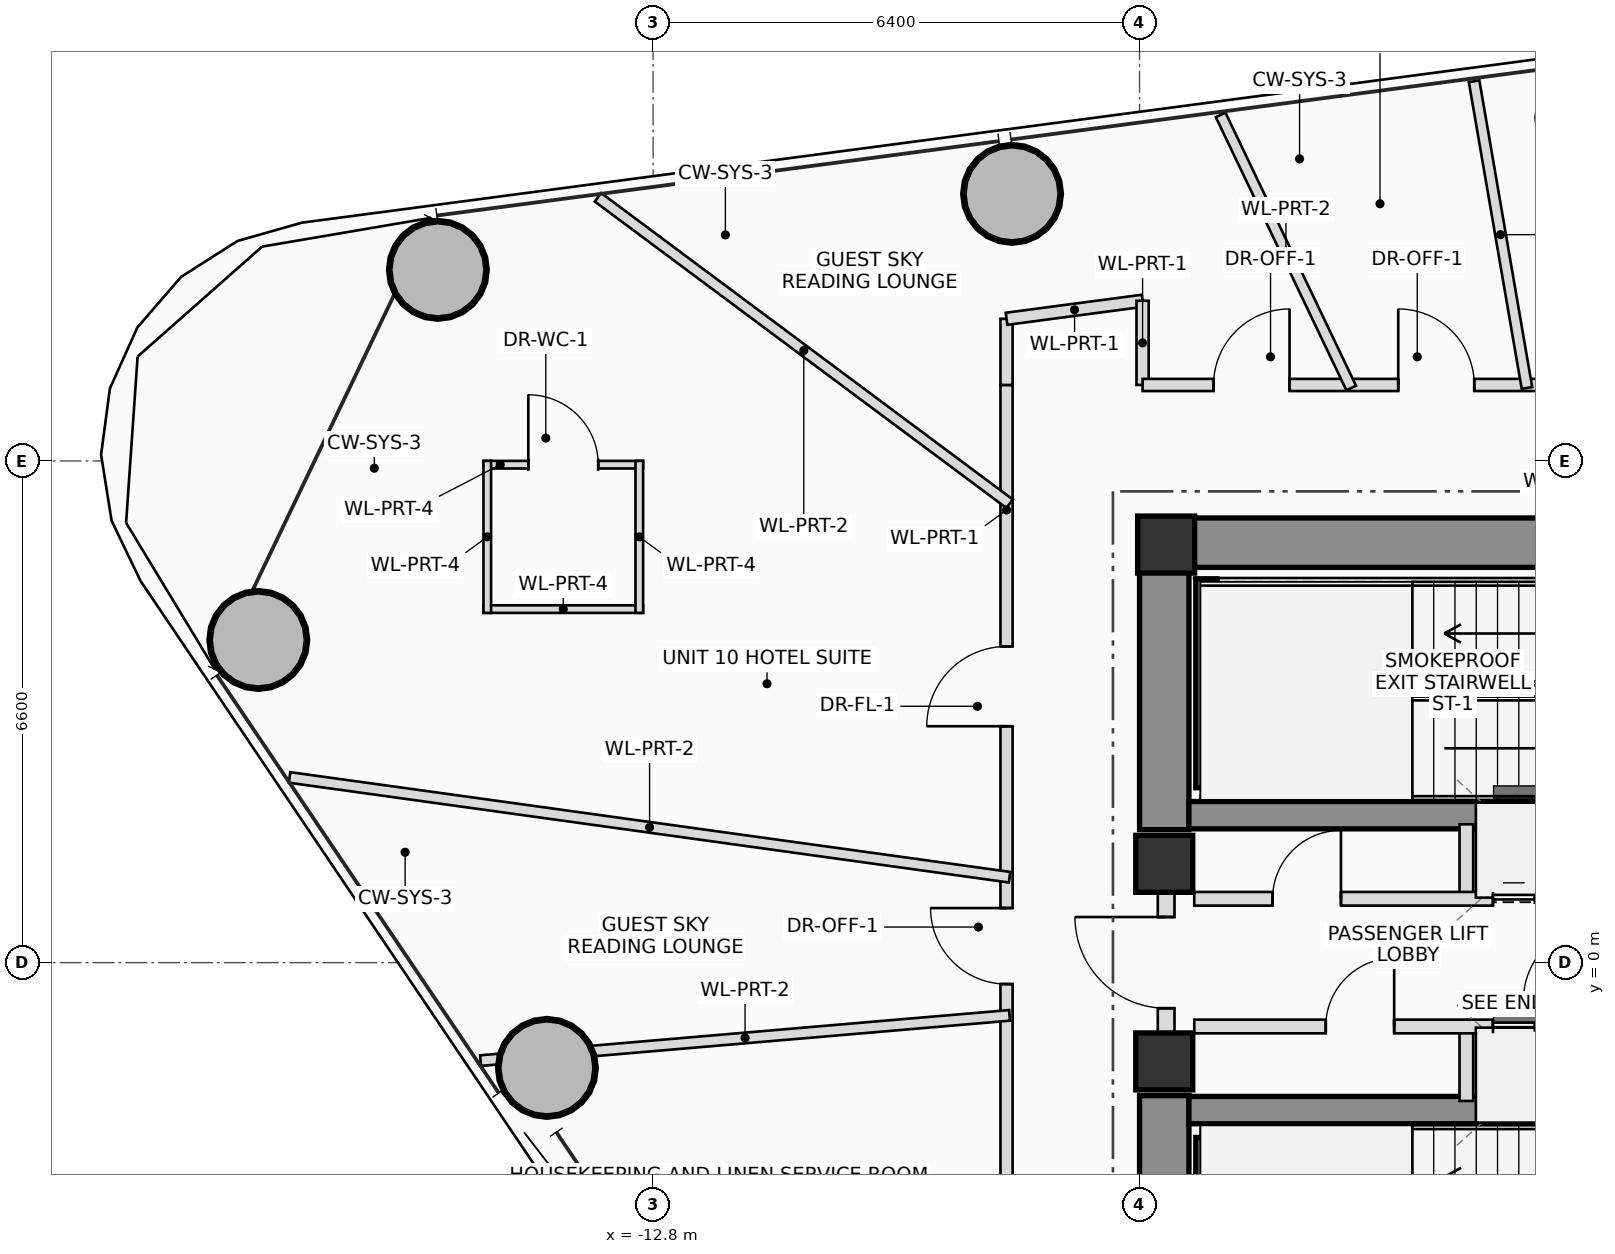
"""IFC4 building model, lengths in metres.
Left out: names, types, materials, properties, quantities, classifications, styles, units other than length and angle.
Written with IfcOpenShell. Run it as: python <this file> out.ifc"""

import sys

from ifc_helpers import new_model, si_unit, direction, frame, frame_2d, origin, origin_2d, place, context, subcontext, project, spatial, rectangle, hollow_circle, extrude, source, transform, mapped, element, fill, save


model = new_model("IFC4")
c1 = context("Model", 3, precision=1e-05, world=origin(), true_north=direction((0.0, 1.0)))
c2 = subcontext(c1, "Body", "Model", "MODEL_VIEW")
j1 = project(units=[si_unit("LENGTHUNIT", "METRE"), si_unit("PLANEANGLEUNIT", "RADIAN")], contexts=[c1])
p1 = place(None, origin())
s1 = spatial("IfcSite", under=j1, at=p1, CompositionType="ELEMENT")
p2 = place(p1, origin())
s2 = spatial("IfcBuilding", under=s1, at=p2, CompositionType="ELEMENT")
p3 = place(p2, frame((0.0, 0.0, 179.45)))
s3 = spatial("IfcBuildingStorey", under=s2, at=p3, CompositionType="ELEMENT", Elevation=179.45)
m1 = source(origin(), c2, "Body", "SweptSolid", [
    extrude(rectangle(XDim=0.75, YDim=0.75, at=origin_2d()), origin(), (0.0, 0.0, 1.0), 3.45),
])
p4 = place(p3, frame((-6.05, 5.5, 0.0), z_axis=(0.0, 0.0, 1.0), x_axis=(1.0, 0.0, 0.0)))
e1 = element("IfcColumn", 1, at=p4, inside=s3, PredefinedType="COLUMN", context=c2, shape_type="MappedRepresentation", body=[
    mapped(m1, transform((0.0, 0.0, 0.0), scale=1.0)),
])
p5 = place(p3, frame((-6.4, 5.525, 0.0), z_axis=(0.0, 0.0, 1.0), x_axis=(1.0, 0.0, 0.0)))
e2 = element("IfcWall", 2, at=p5, inside=s3, PredefinedType="SHEAR", context=c2, shape_type="SweptSolid", body=[
    extrude(rectangle(XDim=12.8, YDim=0.65, at=frame_2d((6.4, 0.0))), origin(), (0.0, 0.0, 1.0), 3.45),
])
p6 = place(p5, frame((8.6, 0.0, 0.0)))
e3 = element("IfcOpeningElement", 3, at=p6, cuts=e2, PredefinedType="OPENING", context=c2, shape_type="SweptSolid", body=[
    extrude(rectangle(XDim=1.2, YDim=2.2, at=frame_2d((0.6, 1.1))), frame((0.0, 0.335, 0.0), z_axis=(0.0, -1.0, 0.0), x_axis=(1.0, 0.0, 0.0)), (0.0, 0.0, 1.0), 0.67),
])
for number, where, z_axis, x_axis in (
    (4, (-6.075, -5.2, 0.0), (0.0, 0.0, 1.0), (0.0, 1.0, 0.0)),
    (5, (-6.075, 1.75, 0.0), (0.0, 0.0, 1.0), (0.0, 1.0, 0.0)),
):
    element("IfcWall", number, at=place(p3, frame(where, z_axis=z_axis, x_axis=x_axis)), inside=s3, PredefinedType="SHEAR", context=c2, shape_type="SweptSolid", body=[
        extrude(rectangle(XDim=3.45, YDim=0.65, at=frame_2d((1.725, 0.0))), origin(), (0.0, 0.0, 1.0), 3.45),
    ])
for number, where, z_axis, x_axis in (
    (6, (-5.75, 1.94, 0.0), (0.0, 0.0, 1.0), (1.0, 0.0, 0.0)),
    (7, (-5.75, -1.94, 0.0), (0.0, 0.0, 1.0), (1.0, 0.0, 0.0)),
):
    element("IfcWall", number, at=place(p3, frame(where, z_axis=z_axis, x_axis=x_axis)), inside=s3, PredefinedType="SHEAR", context=c2, shape_type="SweptSolid", body=[
        extrude(rectangle(XDim=11.5, YDim=0.36, at=frame_2d((5.75, 0.0))), origin(), (0.0, 0.0, 1.0), 3.45),
    ])
for number, where, z_axis, x_axis in (
    (8, (-5.52, 2.3, 0.0), (0.0, 0.0, 1.0), (0.0, 1.0, 0.0)),
    (9, (-5.52, -5.05, 0.0), (0.0, 0.0, 1.0), (0.0, 1.0, 0.0)),
):
    element("IfcWall", number, at=place(p3, frame(where, z_axis=z_axis, x_axis=x_axis)), inside=s3, PredefinedType="SHEAR", context=c2, shape_type="SweptSolid", body=[
        extrude(rectangle(XDim=2.75, YDim=0.28, at=frame_2d((1.375, 0.0))), origin(), (0.0, 0.0, 1.0), 3.45),
    ])
for number, where, z_axis, x_axis in (
    (10, (-6.075, -1.3, 0.0), (0.0, 0.0, 1.0), (1.0, 0.0, 0.0)),
    (11, (-6.075, 1.3, 0.0), (0.0, 0.0, 1.0), (1.0, 0.0, 0.0)),
):
    element("IfcColumn", number, at=place(p3, frame(where, z_axis=z_axis, x_axis=x_axis)), inside=s3, PredefinedType="COLUMN", context=c2, shape_type="MappedRepresentation", body=[
        mapped(m1, transform((0.0, 0.0, 0.0), scale=1.0)),
    ])
m2 = source(origin(), c2, "Body", "SweptSolid", [
    extrude(hollow_circle(Radius=0.65, WallThickness=0.045, at=origin_2d()), origin(), (0.0, 0.0, 1.0), 3.45),
])
for number, where, z_axis, x_axis in (
    (12, (-8.077, 10.114, 0.0), (0.0, 0.0, 1.0), (1.0, 0.0, 0.0)),
    (13, (-15.632, 9.114, 0.0), (0.0, 0.0, 1.0), (1.0, 0.0, 0.0)),
    (14, (-17.995, 4.245, 0.0), (0.0, 0.0, 1.0), (1.0, 0.0, 0.0)),
    (15, (-14.198, -1.385, 0.0), (0.0, 0.0, 1.0), (1.0, 0.0, 0.0)),
):
    element("IfcColumn", number, at=place(p3, frame(where, z_axis=z_axis, x_axis=x_axis)), inside=s3, PredefinedType="COLUMN", context=c2, shape_type="MappedRepresentation", body=[
        mapped(m2, transform((0.0, 0.0, 0.0), scale=1.0)),
    ])
p7 = place(p3, frame((-6.05, -0.95, 0.0), z_axis=(0.0, 0.0, 1.0), x_axis=(0.0, 1.0, 0.0)))
e16 = element("IfcWall", 16, at=p7, inside=s3, PredefinedType="PLUMBINGWALL", context=c2, shape_type="SweptSolid", body=[
    extrude(rectangle(XDim=1.9, YDim=0.22, at=frame_2d((0.95, 0.0))), origin(), (0.0, 0.0, 1.0), 2.23),
])
p8 = place(p7, frame((0.35, 0.0, 0.0)))
e17 = element("IfcOpeningElement", 17, at=p8, cuts=e16, PredefinedType="OPENING", context=c2, shape_type="SweptSolid", body=[
    extrude(rectangle(XDim=1.2, YDim=2.2, at=frame_2d((0.6, 1.1))), frame((0.0, 0.12, 0.0), z_axis=(0.0, -1.0, 0.0), x_axis=(1.0, 0.0, 0.0)), (0.0, 0.0, 1.0), 0.24),
])
for number, where, z_axis, x_axis in (
    (18, (-2.1, 0.84, 0.0), (0.0, 0.0, 1.0), (0.0, 1.0, 0.0)),
    (19, (-2.1, -1.82, 0.0), (0.0, 0.0, 1.0), (0.0, 1.0, 0.0)),
):
    element("IfcWall", number, at=place(p3, frame(where, z_axis=z_axis, x_axis=x_axis)), inside=s3, PredefinedType="PLUMBINGWALL", context=c2, shape_type="SweptSolid", body=[
        extrude(rectangle(XDim=0.98, YDim=0.18, at=frame_2d((0.49, 0.0))), origin(), (0.0, 0.0, 1.0), 3.25),
    ])
p9 = place(p3, frame((-5.68, 0.84, 0.0), z_axis=(0.0, 0.0, 1.0), x_axis=(1.0, 0.0, 0.0)))
e20 = element("IfcWall", 20, at=p9, inside=s3, PredefinedType="PLUMBINGWALL", context=c2, shape_type="SweptSolid", body=[
    extrude(rectangle(XDim=11.33, YDim=0.18, at=frame_2d((5.665, 0.0))), origin(), (0.0, 0.0, 1.0), 3.25),
])
p10 = place(p9, frame((1.03, 0.0, 0.0)))
e21 = element("IfcOpeningElement", 21, at=p10, cuts=e20, PredefinedType="OPENING", context=c2, shape_type="SweptSolid", body=[
    extrude(rectangle(XDim=0.9, YDim=2.05, at=frame_2d((0.45, 1.025))), frame((0.0, 0.1, 0.0), z_axis=(0.0, -1.0, 0.0), x_axis=(1.0, 0.0, 0.0)), (0.0, 0.0, 1.0), 0.2),
])
p11 = place(p9, frame((3.93, 0.0, 0.0)))
e22 = element("IfcOpeningElement", 22, at=p11, cuts=e20, PredefinedType="OPENING", context=c2, shape_type="SweptSolid", body=[
    extrude(rectangle(XDim=1.1, YDim=2.2, at=frame_2d((0.55, 1.1))), frame((0.0, 0.1, 0.0), z_axis=(0.0, -1.0, 0.0), x_axis=(1.0, 0.0, 0.0)), (0.0, 0.0, 1.0), 0.2),
])
p12 = place(p9, frame((5.63, 0.0, 0.0)))
e23 = element("IfcOpeningElement", 23, at=p12, cuts=e20, PredefinedType="OPENING", context=c2, shape_type="SweptSolid", body=[
    extrude(rectangle(XDim=1.1, YDim=2.2, at=frame_2d((0.55, 1.1))), frame((0.0, 0.1, 0.0), z_axis=(0.0, -1.0, 0.0), x_axis=(1.0, 0.0, 0.0)), (0.0, 0.0, 1.0), 0.2),
])
p13 = place(p9, frame((10.25, 0.0, 0.0)))
e24 = element("IfcOpeningElement", 24, at=p13, cuts=e20, PredefinedType="OPENING", context=c2, shape_type="SweptSolid", body=[
    extrude(rectangle(XDim=0.9, YDim=2.05, at=frame_2d((0.45, 1.025))), frame((0.0, 0.1, 0.0), z_axis=(0.0, -1.0, 0.0), x_axis=(1.0, 0.0, 0.0)), (0.0, 0.0, 1.0), 0.2),
])
p14 = place(p3, frame((-5.68, -0.84, 0.0), z_axis=(0.0, 0.0, 1.0), x_axis=(1.0, 0.0, 0.0)))
e25 = element("IfcWall", 25, at=p14, inside=s3, PredefinedType="PLUMBINGWALL", context=c2, shape_type="SweptSolid", body=[
    extrude(rectangle(XDim=11.33, YDim=0.18, at=frame_2d((5.665, 0.0))), origin(), (0.0, 0.0, 1.0), 3.25),
])
p15 = place(p14, frame((1.73, 0.0, 0.0)))
e26 = element("IfcOpeningElement", 26, at=p15, cuts=e25, PredefinedType="OPENING", context=c2, shape_type="SweptSolid", body=[
    extrude(rectangle(XDim=0.9, YDim=2.05, at=frame_2d((0.45, 1.025))), frame((0.0, 0.1, 0.0), z_axis=(0.0, -1.0, 0.0), x_axis=(1.0, 0.0, 0.0)), (0.0, 0.0, 1.0), 0.2),
])
p16 = place(p14, frame((3.93, 0.0, 0.0)))
e27 = element("IfcOpeningElement", 27, at=p16, cuts=e25, PredefinedType="OPENING", context=c2, shape_type="SweptSolid", body=[
    extrude(rectangle(XDim=1.1, YDim=2.2, at=frame_2d((0.55, 1.1))), frame((0.0, 0.1, 0.0), z_axis=(0.0, -1.0, 0.0), x_axis=(1.0, 0.0, 0.0)), (0.0, 0.0, 1.0), 0.2),
])
p17 = place(p14, frame((5.63, 0.0, 0.0)))
e28 = element("IfcOpeningElement", 28, at=p17, cuts=e25, PredefinedType="OPENING", context=c2, shape_type="SweptSolid", body=[
    extrude(rectangle(XDim=1.1, YDim=2.2, at=frame_2d((0.55, 1.1))), frame((0.0, 0.1, 0.0), z_axis=(0.0, -1.0, 0.0), x_axis=(1.0, 0.0, 0.0)), (0.0, 0.0, 1.0), 0.2),
])
p18 = place(p14, frame((9.58, 0.0, 0.0)))
e29 = element("IfcOpeningElement", 29, at=p18, cuts=e25, PredefinedType="OPENING", context=c2, shape_type="SweptSolid", body=[
    extrude(rectangle(XDim=0.9, YDim=2.05, at=frame_2d((0.45, 1.025))), frame((0.0, 0.1, 0.0), z_axis=(0.0, -1.0, 0.0), x_axis=(1.0, 0.0, 0.0)), (0.0, 0.0, 1.0), 0.2),
])
p19 = place(p3, frame((-15.032, 6.551, 0.0), z_axis=(0.0, 0.0, 1.0), x_axis=(1.0, 0.0, 0.0)))
e30 = element("IfcWall", 30, at=p19, inside=s3, PredefinedType="PARTITIONING", context=c2, shape_type="SweptSolid", body=[
    extrude(rectangle(XDim=2.1, YDim=0.1, at=frame_2d((1.05, 0.0))), origin(), (0.0, 0.0, 1.0), 2.905),
])
p20 = place(p19, frame((0.59, 0.0, 0.0)))
e31 = element("IfcOpeningElement", 31, at=p20, cuts=e30, PredefinedType="OPENING", context=c2, shape_type="SweptSolid", body=[
    extrude(rectangle(XDim=0.92, YDim=2.1, at=frame_2d((0.46, 1.05))), frame((0.0, 0.06, 0.0), z_axis=(0.0, -1.0, 0.0), x_axis=(1.0, 0.0, 0.0)), (0.0, 0.0, 1.0), 0.12),
])
p21 = place(p3, frame((-12.932, 4.651, 0.0), z_axis=(0.0, 0.0, 1.0), x_axis=(-1.0, 0.0, 0.0)))
e32 = element("IfcWall", 32, at=p21, inside=s3, PredefinedType="PARTITIONING", context=c2, shape_type="SweptSolid", body=[
    extrude(rectangle(XDim=2.1, YDim=0.1, at=frame_2d((1.05, 0.0))), origin(), (0.0, 0.0, 1.0), 2.605),
])
for number, where, z_axis, x_axis in (
    (33, (-12.982, 6.601, 0.0), (0.0, 0.0, 1.0), (0.0, -1.0, 0.0)),
    (34, (-14.982, 4.601, 0.0), (0.0, 0.0, 1.0), (0.0, 1.0, 0.0)),
):
    element("IfcWall", number, at=place(p3, frame(where, z_axis=z_axis, x_axis=x_axis)), inside=s3, PredefinedType="PARTITIONING", context=c2, shape_type="SweptSolid", body=[
        extrude(rectangle(XDim=2.0, YDim=0.1, at=frame_2d((1.0, 0.0))), origin(), (0.0, 0.0, 1.0), 2.605),
    ])
p22 = place(p3, frame((-8.15, -7.454, 0.0), z_axis=(0.0, 0.0, 1.0), x_axis=(0.0, 1.0, 0.0)))
e35 = element("IfcWall", 35, at=p22, inside=s3, PredefinedType="PARTITIONING", context=c2, shape_type="SweptSolid", body=[
    extrude(rectangle(XDim=15.054, YDim=0.16, at=frame_2d((7.527, 0.0))), origin(), (0.0, 0.0, 1.0), 2.605),
])
p23 = place(p22, frame((3.019, 0.0, 0.0)))
e36 = element("IfcOpeningElement", 36, at=p23, cuts=e35, PredefinedType="OPENING", context=c2, shape_type="SweptSolid", body=[
    extrude(rectangle(XDim=0.9, YDim=2.05, at=frame_2d((0.45, 1.025))), frame((0.0, 0.09, 0.0), z_axis=(0.0, -1.0, 0.0), x_axis=(1.0, 0.0, 0.0)), (0.0, 0.0, 1.0), 0.18),
])
p24 = place(p22, frame((7.172, 0.0, 0.0)))
e37 = element("IfcOpeningElement", 37, at=p24, cuts=e35, PredefinedType="OPENING", context=c2, shape_type="SweptSolid", body=[
    extrude(rectangle(XDim=1.0, YDim=2.25, at=frame_2d((0.5, 1.125))), frame((0.0, 0.09, 0.0), z_axis=(0.0, -1.0, 0.0), x_axis=(1.0, 0.0, 0.0)), (0.0, 0.0, 1.0), 0.18),
])
p25 = place(p22, frame((10.563, 0.0, 0.0)))
e38 = element("IfcOpeningElement", 38, at=p25, cuts=e35, PredefinedType="OPENING", context=c2, shape_type="SweptSolid", body=[
    extrude(rectangle(XDim=1.05, YDim=2.2, at=frame_2d((0.525, 1.1))), frame((0.0, 0.09, 0.0), z_axis=(0.0, -1.0, 0.0), x_axis=(1.0, 0.0, 0.0)), (0.0, 0.0, 1.0), 0.18),
])
p26 = place(p3, frame((-8.15, 7.6, 0.0), z_axis=(0.0, 0.0, 1.0), x_axis=(0.0, 1.0, 0.0)))
e39 = element("IfcWall", 39, at=p26, inside=s3, PredefinedType="PARTITIONING", context=c2, shape_type="SweptSolid", body=[
    extrude(rectangle(XDim=0.87, YDim=0.16, at=frame_2d((0.435, 0.0))), origin(), (0.0, 0.0, 1.0), 2.805),
])
p27 = place(p3, frame((-8.15, 8.47, 0.0), z_axis=(0.0, 0.0, 1.0), x_axis=(0.991342086618, 0.131304483168, 0.0)))
e40 = element("IfcWall", 40, at=p27, inside=s3, PredefinedType="PARTITIONING", context=c2, shape_type="SweptSolid", body=[
    extrude(rectangle(XDim=1.805, YDim=0.16, at=frame_2d((0.903, 0.0))), origin(), (0.0, 0.0, 1.0), 2.605),
])
p28 = place(p3, frame((-6.36, 8.708, 0.0), z_axis=(0.0, 0.0, 1.0), x_axis=(0.0, -1.0, 0.0)))
e41 = element("IfcWall", 41, at=p28, inside=s3, PredefinedType="PARTITIONING", context=c2, shape_type="SweptSolid", body=[
    extrude(rectangle(XDim=1.107, YDim=0.16, at=frame_2d((0.554, 0.0))), origin(), (0.0, 0.0, 1.0), 2.805),
])
p29 = place(p3, frame((-6.36, 7.6, 0.0), z_axis=(0.0, 0.0, 1.0), x_axis=(1.0, 0.0, 0.0)))
e42 = element("IfcWall", 42, at=p29, inside=s3, PredefinedType="PARTITIONING", context=c2, shape_type="SweptSolid", body=[
    extrude(rectangle(XDim=11.61, YDim=0.16, at=frame_2d((5.805, 0.0))), origin(), (0.0, 0.0, 1.0), 2.605),
])
p30 = place(p29, frame((0.934, 0.0, 0.0)))
e43 = element("IfcOpeningElement", 43, at=p30, cuts=e42, PredefinedType="OPENING", context=c2, shape_type="SweptSolid", body=[
    extrude(rectangle(XDim=1.0, YDim=2.25, at=frame_2d((0.5, 1.125))), frame((0.0, 0.09, 0.0), z_axis=(0.0, -1.0, 0.0), x_axis=(1.0, 0.0, 0.0)), (0.0, 0.0, 1.0), 0.18),
])
p31 = place(p29, frame((3.364, 0.0, 0.0)))
e44 = element("IfcOpeningElement", 44, at=p31, cuts=e42, PredefinedType="OPENING", context=c2, shape_type="SweptSolid", body=[
    extrude(rectangle(XDim=1.0, YDim=2.25, at=frame_2d((0.5, 1.125))), frame((0.0, 0.09, 0.0), z_axis=(0.0, -1.0, 0.0), x_axis=(1.0, 0.0, 0.0)), (0.0, 0.0, 1.0), 0.18),
])
p32 = place(p29, frame((6.826, 0.0, 0.0)))
e45 = element("IfcOpeningElement", 45, at=p32, cuts=e42, PredefinedType="OPENING", context=c2, shape_type="SweptSolid", body=[
    extrude(rectangle(XDim=1.0, YDim=2.25, at=frame_2d((0.5, 1.125))), frame((0.0, 0.09, 0.0), z_axis=(0.0, -1.0, 0.0), x_axis=(1.0, 0.0, 0.0)), (0.0, 0.0, 1.0), 0.18),
])
p33 = place(p29, frame((10.285, 0.0, 0.0)))
e46 = element("IfcOpeningElement", 46, at=p33, cuts=e42, PredefinedType="OPENING", context=c2, shape_type="SweptSolid", body=[
    extrude(rectangle(XDim=1.0, YDim=2.25, at=frame_2d((0.5, 1.125))), frame((0.0, 0.09, 0.0), z_axis=(0.0, -1.0, 0.0), x_axis=(1.0, 0.0, 0.0)), (0.0, 0.0, 1.0), 0.18),
])
p34 = place(p3, frame((-1.303, 7.56, 0.0), z_axis=(0.0, 0.0, 1.0), x_axis=(-0.169831033654, 0.985473195987, 0.0)))
e47 = element("IfcWall", 47, at=p34, inside=s3, PredefinedType="PARTITIONING", context=c2, shape_type="SweptSolid", body=[
    extrude(rectangle(XDim=4.094, YDim=0.14, at=frame_2d((2.047, 0.0))), origin(), (0.0, 0.0, 1.0), 2.605),
])
p35 = place(p3, frame((-3.615, 7.56, 0.0), z_axis=(0.0, 0.0, 1.0), x_axis=(-0.431353551372, 0.902182971308, 0.0)))
e48 = element("IfcWall", 48, at=p35, inside=s3, PredefinedType="PARTITIONING", context=c2, shape_type="SweptSolid", body=[
    extrude(rectangle(XDim=3.983, YDim=0.14, at=frame_2d((1.991, 0.0))), origin(), (0.0, 0.0, 1.0), 2.605),
])
p36 = place(p3, frame((-8.11, 6.038, 0.0), z_axis=(0.0, 0.0, 1.0), x_axis=(-0.802099870975, 0.597189917012, 0.0)))
e49 = element("IfcWall", 49, at=p36, inside=s3, PredefinedType="PARTITIONING", context=c2, shape_type="SweptSolid", body=[
    extrude(rectangle(XDim=6.751, YDim=0.14, at=frame_2d((3.375, 0.0))), origin(), (0.0, 0.0, 1.0), 2.605),
])
p37 = place(p3, frame((-8.11, 1.124, 0.0), z_axis=(0.0, 0.0, 1.0), x_axis=(-0.990537537155, 0.137242076229, 0.0)))
e50 = element("IfcWall", 50, at=p37, inside=s3, PredefinedType="PARTITIONING", context=c2, shape_type="SweptSolid", body=[
    extrude(rectangle(XDim=9.563, YDim=0.14, at=frame_2d((4.782, 0.0))), origin(), (0.0, 0.0, 1.0), 2.765),
])
p38 = place(p3, frame((-8.11, -0.694, 0.0), z_axis=(0.0, 0.0, 1.0), x_axis=(-0.996360400447, -0.085240556199, 0.0)))
e51 = element("IfcWall", 51, at=p38, inside=s3, PredefinedType="PARTITIONING", context=c2, shape_type="SweptSolid", body=[
    extrude(rectangle(XDim=6.986, YDim=0.14, at=frame_2d((3.493, 0.0))), origin(), (0.0, 0.0, 1.0), 2.805),
])
p39 = place(p8, origin())
e52 = element("IfcDoor", 52, at=p39, inside=s3, OperationType="SINGLE_SWING_RIGHT", PredefinedType="DOOR", context=c2, shape_type="SweptSolid", body=[
    extrude(rectangle(XDim=1.2, YDim=2.2, at=frame_2d((0.6, 1.1))), frame((0.0, 0.025, 0.0), z_axis=(0.0, -1.0, 0.0), x_axis=(1.0, 0.0, 0.0)), (0.0, 0.0, 1.0), 0.05),
])
fill(e17, e52)
p40 = place(p10, origin())
e53 = element("IfcDoor", 53, at=p40, inside=s3, OperationType="SINGLE_SWING_RIGHT", PredefinedType="DOOR", context=c2, shape_type="SweptSolid", body=[
    extrude(rectangle(XDim=0.9, YDim=2.05, at=frame_2d((0.45, 1.025))), frame((0.0, 0.025, 0.0), z_axis=(0.0, -1.0, 0.0), x_axis=(1.0, 0.0, 0.0)), (0.0, 0.0, 1.0), 0.05),
])
fill(e21, e53)
p41 = place(p11, origin())
e54 = element("IfcDoor", 54, at=p41, inside=s3, OperationType="DOUBLE_DOOR_SLIDING", PredefinedType="DOOR", context=c2, shape_type="SweptSolid", body=[
    extrude(rectangle(XDim=1.1, YDim=2.2, at=frame_2d((0.55, 1.1))), frame((0.0, 0.025, 0.0), z_axis=(0.0, -1.0, 0.0), x_axis=(1.0, 0.0, 0.0)), (0.0, 0.0, 1.0), 0.05),
])
fill(e22, e54)
p42 = place(p15, origin())
e55 = element("IfcDoor", 55, at=p42, inside=s3, OperationType="SINGLE_SWING_RIGHT", PredefinedType="DOOR", context=c2, shape_type="SweptSolid", body=[
    extrude(rectangle(XDim=0.9, YDim=2.05, at=frame_2d((0.45, 1.025))), frame((0.0, 0.025, 0.0), z_axis=(0.0, -1.0, 0.0), x_axis=(1.0, 0.0, 0.0)), (0.0, 0.0, 1.0), 0.05),
])
fill(e26, e55)
p43 = place(p16, origin())
e56 = element("IfcDoor", 56, at=p43, inside=s3, OperationType="DOUBLE_DOOR_SLIDING", PredefinedType="DOOR", context=c2, shape_type="SweptSolid", body=[
    extrude(rectangle(XDim=1.1, YDim=2.2, at=frame_2d((0.55, 1.1))), frame((0.0, 0.025, 0.0), z_axis=(0.0, -1.0, 0.0), x_axis=(1.0, 0.0, 0.0)), (0.0, 0.0, 1.0), 0.05),
])
fill(e27, e56)
p44 = place(p20, origin())
e57 = element("IfcDoor", 57, at=p44, inside=s3, OperationType="SINGLE_SWING_LEFT", PredefinedType="DOOR", context=c2, shape_type="SweptSolid", body=[
    extrude(rectangle(XDim=0.92, YDim=2.1, at=frame_2d((0.46, 1.05))), frame((0.0, 0.025, 0.0), z_axis=(0.0, -1.0, 0.0), x_axis=(1.0, 0.0, 0.0)), (0.0, 0.0, 1.0), 0.05),
])
fill(e31, e57)
p45 = place(p24, origin())
e58 = element("IfcDoor", 58, at=p45, inside=s3, OperationType="SINGLE_SWING_RIGHT", PredefinedType="DOOR", context=c2, shape_type="SweptSolid", body=[
    extrude(rectangle(XDim=1.0, YDim=2.25, at=frame_2d((0.5, 1.125))), frame((0.0, 0.025, 0.0), z_axis=(0.0, -1.0, 0.0), x_axis=(1.0, 0.0, 0.0)), (0.0, 0.0, 1.0), 0.05),
])
fill(e37, e58)
p46 = place(p25, origin())
e59 = element("IfcDoor", 59, at=p46, inside=s3, OperationType="SINGLE_SWING_LEFT", PredefinedType="DOOR", context=c2, shape_type="SweptSolid", body=[
    extrude(rectangle(XDim=1.05, YDim=2.2, at=frame_2d((0.525, 1.1))), frame((0.0, 0.025, 0.0), z_axis=(0.0, -1.0, 0.0), x_axis=(1.0, 0.0, 0.0)), (0.0, 0.0, 1.0), 0.05),
])
fill(e38, e59)
p47 = place(p30, origin())
e60 = element("IfcDoor", 60, at=p47, inside=s3, OperationType="SINGLE_SWING_RIGHT", PredefinedType="DOOR", context=c2, shape_type="SweptSolid", body=[
    extrude(rectangle(XDim=1.0, YDim=2.25, at=frame_2d((0.5, 1.125))), frame((0.0, 0.025, 0.0), z_axis=(0.0, -1.0, 0.0), x_axis=(1.0, 0.0, 0.0)), (0.0, 0.0, 1.0), 0.05),
])
fill(e43, e60)
p48 = place(p31, origin())
e61 = element("IfcDoor", 61, at=p48, inside=s3, OperationType="SINGLE_SWING_LEFT", PredefinedType="DOOR", context=c2, shape_type="SweptSolid", body=[
    extrude(rectangle(XDim=1.0, YDim=2.25, at=frame_2d((0.5, 1.125))), frame((0.0, 0.025, 0.0), z_axis=(0.0, -1.0, 0.0), x_axis=(1.0, 0.0, 0.0)), (0.0, 0.0, 1.0), 0.05),
])
fill(e44, e61)
save(model, sys.argv[1])
